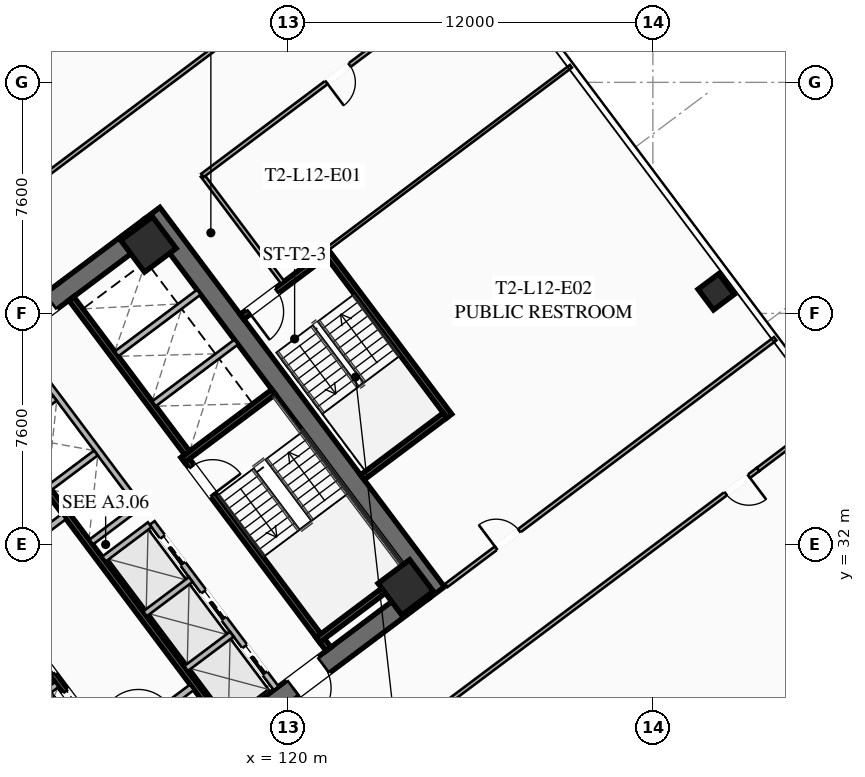
"""IFC4 building model, lengths in metres.
Left out: names, types, materials, properties, quantities, classifications, styles, units other than length and angle.
Written with IfcOpenShell. Run it as: python <this file> out.ifc"""

import sys

from ifc_helpers import new_model, si_unit, direction, frame, frame_2d, origin, origin_2d, place, context, subcontext, project, spatial, rectangle, hollow_rectangle, extrude, element, fill, save


model = new_model("IFC4")
c1 = context("Model", 3, precision=1e-05, world=origin(), true_north=direction((0.0, 1.0)))
c2 = subcontext(c1, "Body", "Model", "MODEL_VIEW")
j1 = project(units=[si_unit("LENGTHUNIT", "METRE"), si_unit("PLANEANGLEUNIT", "RADIAN")], contexts=[c1])
p1 = place(None, origin())
s1 = spatial("IfcSite", under=j1, at=p1, CompositionType="ELEMENT")
p2 = place(p1, origin())
s2 = spatial("IfcBuilding", under=s1, at=p2, CompositionType="ELEMENT")
p3 = place(p2, frame((0.0, 0.0, 49.45)))
s3 = spatial("IfcBuildingStorey", under=s2, at=p3, CompositionType="ELEMENT", Elevation=49.45)
for number, where, z_axis, x_axis in (
    (1, (112.476, 21.107, 0.0), (0.0, 0.0, 1.0), (-0.6, 0.8, 0.0)),
    (2, (115.524, 42.893, 0.0), (0.0, 0.0, 1.0), (0.6, -0.8, 0.0)),
):
    element("IfcWall", number, at=place(p3, frame(where, z_axis=z_axis, x_axis=x_axis)), inside=s3, PredefinedType="SHEAR", context=c2, shape_type="SweptSolid", body=[
        extrude(rectangle(XDim=15.6, YDim=0.65, at=frame_2d((7.8, 0.0))), origin(), (0.0, 0.0, 1.0), 3.55),
    ])
p4 = place(p3, frame((124.429, 30.478, 0.0), z_axis=(0.0, 0.0, 1.0), x_axis=(-0.799998028465, -0.600002628705, 0.0)))
e3 = element("IfcWall", 3, at=p4, inside=s3, PredefinedType="SHEAR", context=c2, shape_type="SweptSolid", body=[
    extrude(rectangle(XDim=14.86, YDim=0.65, at=frame_2d((7.43, 0.0))), origin(), (0.0, 0.0, 1.0), 3.55),
])
p5 = place(p4, frame((9.13, 0.0, 0.0)))
e4 = element("IfcOpeningElement", 4, at=p5, cuts=e3, PredefinedType="OPENING", context=c2, shape_type="SweptSolid", body=[
    extrude(rectangle(XDim=1.25, YDim=2.25, at=frame_2d((0.625, 1.125))), frame((0.0, 0.335, 0.0), z_axis=(0.0, -1.0, 0.0), x_axis=(1.0, 0.0, 0.0)), (0.0, 0.0, 1.0), 0.67),
])
p6 = place(p4, frame((4.08, 0.0, 0.0)))
e5 = element("IfcOpeningElement", 5, at=p6, cuts=e3, PredefinedType="OPENING", context=c2, shape_type="SweptSolid", body=[
    extrude(rectangle(XDim=1.25, YDim=2.25, at=frame_2d((0.625, 1.125))), frame((0.0, 0.335, 0.0), z_axis=(0.0, -1.0, 0.0), x_axis=(1.0, 0.0, 0.0)), (0.0, 0.0, 1.0), 0.67),
])
p7 = place(p3, frame((103.571, 33.522, 0.0), z_axis=(0.0, 0.0, 1.0), x_axis=(0.799998028465, 0.600002628705, 0.0)))
e6 = element("IfcWall", 6, at=p7, inside=s3, PredefinedType="SHEAR", context=c2, shape_type="SweptSolid", body=[
    extrude(rectangle(XDim=14.86, YDim=0.65, at=frame_2d((7.43, 0.0))), origin(), (0.0, 0.0, 1.0), 3.55),
])
p8 = place(p7, frame((4.48, 0.0, 0.0)))
e7 = element("IfcOpeningElement", 7, at=p8, cuts=e6, PredefinedType="OPENING", context=c2, shape_type="SweptSolid", body=[
    extrude(rectangle(XDim=1.25, YDim=2.25, at=frame_2d((0.625, 1.125))), frame((0.0, 0.335, 0.0), z_axis=(0.0, -1.0, 0.0), x_axis=(1.0, 0.0, 0.0)), (0.0, 0.0, 1.0), 0.67),
])
p9 = place(p7, frame((9.53, 0.0, 0.0)))
e8 = element("IfcOpeningElement", 8, at=p9, cuts=e6, PredefinedType="OPENING", context=c2, shape_type="SweptSolid", body=[
    extrude(rectangle(XDim=1.25, YDim=2.25, at=frame_2d((0.625, 1.125))), frame((0.0, 0.335, 0.0), z_axis=(0.0, -1.0, 0.0), x_axis=(1.0, 0.0, 0.0)), (0.0, 0.0, 1.0), 0.67),
])
for number, where, z_axis, x_axis in (
    (9, (123.87, 30.59, 0.0), (0.0, 0.0, 1.0), (0.8, 0.6, 0.0)),
    (10, (115.41, 41.87, 0.0), (0.0, 0.0, 1.0), (0.8, 0.6, 0.0)),
):
    element("IfcColumn", number, at=place(p3, frame(where, z_axis=z_axis, x_axis=x_axis)), inside=s3, PredefinedType="COLUMN", context=c2, shape_type="SweptSolid", body=[
        extrude(hollow_rectangle(XDim=1.3, YDim=1.3, WallThickness=0.05, at=origin_2d()), origin(), (0.0, 0.0, 1.0), 3.35),
    ])
p10 = place(p3, frame((134.08, 40.31, 0.0), z_axis=(0.0, 0.0, 1.0), x_axis=(0.799999996291, 0.600000004945, 0.0)))
e11 = element("IfcColumn", 11, at=p10, inside=s3, PredefinedType="COLUMN", context=c2, shape_type="SweptSolid", body=[
    extrude(hollow_rectangle(XDim=0.85, YDim=0.85, WallThickness=0.035, at=origin_2d()), origin(), (0.0, 0.0, 1.0), 3.35),
])
p11 = place(p3, frame((116.56, 34.92, 0.0), z_axis=(0.0, 0.0, 1.0), x_axis=(0.600009827119, -0.799992629566, 0.0)))
e12 = element("IfcWall", 12, at=p11, inside=s3, PredefinedType="SHEAR", context=c2, shape_type="SweptSolid", body=[
    extrude(rectangle(XDim=7.95, YDim=0.2, at=frame_2d((3.975, 0.0))), origin(), (0.0, 0.0, 1.0), 3.35),
])
p12 = place(p11, frame((0.45, 0.0, 0.0)))
e13 = element("IfcOpeningElement", 13, at=p12, cuts=e12, PredefinedType="OPENING", context=c2, shape_type="SweptSolid", body=[
    extrude(rectangle(XDim=1.15, YDim=2.2, at=frame_2d((0.575, 1.1))), frame((0.0, 0.11, 0.0), z_axis=(0.0, -1.0, 0.0), x_axis=(1.0, 0.0, 0.0)), (0.0, 0.0, 1.0), 0.22),
])
for number, where, z_axis, x_axis in (
    (14, (116.54, 34.78, 0.0), (0.0, 0.0, 1.0), (0.8, 0.6, 0.0)),
    (15, (120.98, 28.86, 0.0), (0.0, 0.0, 1.0), (0.8, 0.6, 0.0)),
):
    element("IfcWall", number, at=place(p3, frame(where, z_axis=z_axis, x_axis=x_axis)), inside=s3, PredefinedType="SHEAR", context=c2, shape_type="SweptSolid", body=[
        extrude(rectangle(XDim=3.73, YDim=0.2, at=frame_2d((1.865, 0.0))), origin(), (0.0, 0.0, 1.0), 3.35),
    ])
p13 = place(p3, frame((117.938, 26.016, 0.0), z_axis=(0.0, 0.0, 1.0), x_axis=(-0.600005463273, 0.799995902516, 0.0)))
e16 = element("IfcWall", 16, at=p13, inside=s3, PredefinedType="SHEAR", context=c2, shape_type="SweptSolid", body=[
    extrude(rectangle(XDim=14.3, YDim=0.2, at=frame_2d((7.15, 0.0))), origin(), (0.0, 0.0, 1.0), 3.35),
])
p14 = place(p3, frame((110.104, 31.028, 0.0), z_axis=(0.0, 0.0, 1.0), x_axis=(0.800018601094, 0.59997519774, 0.0)))
e17 = element("IfcWall", 17, at=p14, inside=s3, PredefinedType="SOLIDWALL", context=c2, shape_type="SweptSolid", body=[
    extrude(rectangle(XDim=3.15, YDim=0.22, at=frame_2d((1.575, 0.0))), origin(), (0.0, 0.0, 1.0), 2.703),
])
p15 = place(p3, frame((114.316, 25.412, 0.0), z_axis=(0.0, 0.0, 1.0), x_axis=(0.800018601094, 0.59997519774, 0.0)))
e18 = element("IfcWall", 18, at=p15, inside=s3, PredefinedType="SOLIDWALL", context=c2, shape_type="SweptSolid", body=[
    extrude(rectangle(XDim=3.15, YDim=0.22, at=frame_2d((1.575, 0.0))), origin(), (0.0, 0.0, 1.0), 2.703),
])
p16 = place(p15, frame((0.95, 0.0, 0.0)))
e19 = element("IfcOpeningElement", 19, at=p16, cuts=e18, PredefinedType="OPENING", context=c2, shape_type="SweptSolid", body=[
    extrude(rectangle(XDim=1.25, YDim=2.25, at=frame_2d((0.625, 1.125))), frame((0.0, 0.12, 0.0), z_axis=(0.0, -1.0, 0.0), x_axis=(1.0, 0.0, 0.0)), (0.0, 0.0, 1.0), 0.24),
])
p17 = place(p3, frame((115.13, 23.91, 0.0), z_axis=(0.0, 0.0, 1.0), x_axis=(-0.599975393228, 0.800018454488, 0.0)))
e20 = element("IfcWall", 20, at=p17, inside=s3, PredefinedType="SHEAR", context=c2, shape_type="SweptSolid", body=[
    extrude(rectangle(XDim=6.35, YDim=0.2, at=frame_2d((3.175, 0.0))), origin(), (0.0, 0.0, 1.0), 3.35),
])
p18 = place(p17, frame((4.775, 0.0, 0.0)))
e21 = element("IfcOpeningElement", 21, at=p18, cuts=e20, PredefinedType="OPENING", context=c2, shape_type="SweptSolid", body=[
    extrude(rectangle(XDim=1.3, YDim=2.25, at=frame_2d((0.65, 1.125))), frame((0.0, 0.11, 0.0), z_axis=(0.0, -1.0, 0.0), x_axis=(1.0, 0.0, 0.0)), (0.0, 0.0, 1.0), 0.22),
])
p19 = place(p17, frame((2.775, 0.0, 0.0)))
e22 = element("IfcOpeningElement", 22, at=p19, cuts=e20, PredefinedType="OPENING", context=c2, shape_type="SweptSolid", body=[
    extrude(rectangle(XDim=1.3, YDim=2.25, at=frame_2d((0.65, 1.125))), frame((0.0, 0.11, 0.0), z_axis=(0.0, -1.0, 0.0), x_axis=(1.0, 0.0, 0.0)), (0.0, 0.0, 1.0), 0.22),
])
p20 = place(p17, frame((0.575, 0.0, 0.0)))
e23 = element("IfcOpeningElement", 23, at=p20, cuts=e20, PredefinedType="OPENING", context=c2, shape_type="SweptSolid", body=[
    extrude(rectangle(XDim=1.3, YDim=2.25, at=frame_2d((0.65, 1.125))), frame((0.0, 0.11, 0.0), z_axis=(0.0, -1.0, 0.0), x_axis=(1.0, 0.0, 0.0)), (0.0, 0.0, 1.0), 0.22),
])
p21 = place(p3, frame((109.688, 25.366, 0.0), z_axis=(0.0, 0.0, 1.0), x_axis=(0.8, 0.6, 0.0)))
e24 = element("IfcWall", 24, at=p21, inside=s3, PredefinedType="SOLIDWALL", context=c2, shape_type="SweptSolid", body=[
    extrude(rectangle(XDim=3.38, YDim=0.2, at=frame_2d((1.69, 0.0))), origin(), (0.0, 0.0, 1.0), 3.35),
])
p22 = place(p3, frame((112.87, 40.09, 0.0), z_axis=(0.0, 0.0, 1.0), x_axis=(0.599975393228, -0.800018454488, 0.0)))
e25 = element("IfcWall", 25, at=p22, inside=s3, PredefinedType="SHEAR", context=c2, shape_type="SweptSolid", body=[
    extrude(rectangle(XDim=6.35, YDim=0.2, at=frame_2d((3.175, 0.0))), origin(), (0.0, 0.0, 1.0), 3.35),
])
for number, where, z_axis, x_axis in (
    (26, (115.59, 36.63, 0.0), (0.0, 0.0, 1.0), (0.8, 0.6, 0.0)),
    (27, (114.36, 38.27, 0.0), (0.0, 0.0, 1.0), (0.8, 0.6, 0.0)),
):
    element("IfcWall", number, at=place(p3, frame(where, z_axis=z_axis, x_axis=x_axis)), inside=s3, PredefinedType="SOLIDWALL", context=c2, shape_type="SweptSolid", body=[
        extrude(rectangle(XDim=3.38, YDim=0.2, at=frame_2d((1.69, 0.0))), origin(), (0.0, 0.0, 1.0), 3.35),
    ])
p23 = place(p3, frame((119.61, 27.27, 0.0), z_axis=(0.0, 0.0, 1.0), x_axis=(-0.600011488909, 0.79999138319, 0.0)))
e28 = element("IfcWall", 28, at=p23, inside=s3, PredefinedType="SOLIDWALL", context=c2, shape_type="SweptSolid", body=[
    extrude(rectangle(XDim=6.8, YDim=0.2, at=frame_2d((3.4, 0.0))), origin(), (0.0, 0.0, 1.0), 3.35),
])
p24 = place(p23, frame((0.625, 0.0, 0.0)))
e29 = element("IfcOpeningElement", 29, at=p24, cuts=e28, PredefinedType="OPENING", context=c2, shape_type="SweptSolid", body=[
    extrude(rectangle(XDim=1.1, YDim=2.2, at=frame_2d((0.55, 1.1))), frame((0.0, 0.11, 0.0), z_axis=(0.0, -1.0, 0.0), x_axis=(1.0, 0.0, 0.0)), (0.0, 0.0, 1.0), 0.22),
])
p25 = place(p23, frame((2.875, 0.0, 0.0)))
e30 = element("IfcOpeningElement", 30, at=p25, cuts=e28, PredefinedType="OPENING", context=c2, shape_type="SweptSolid", body=[
    extrude(rectangle(XDim=1.1, YDim=2.2, at=frame_2d((0.55, 1.1))), frame((0.0, 0.11, 0.0), z_axis=(0.0, -1.0, 0.0), x_axis=(1.0, 0.0, 0.0)), (0.0, 0.0, 1.0), 0.22),
])
p26 = place(p23, frame((5.125, 0.0, 0.0)))
e31 = element("IfcOpeningElement", 31, at=p26, cuts=e28, PredefinedType="OPENING", context=c2, shape_type="SweptSolid", body=[
    extrude(rectangle(XDim=1.1, YDim=2.2, at=frame_2d((0.55, 1.1))), frame((0.0, 0.11, 0.0), z_axis=(0.0, -1.0, 0.0), x_axis=(1.0, 0.0, 0.0)), (0.0, 0.0, 1.0), 0.22),
])
p27 = place(p3, frame((116.646, 27.922, 0.0), z_axis=(0.0, 0.0, 1.0), x_axis=(0.8, 0.6, 0.0)))
e32 = element("IfcWall", 32, at=p27, inside=s3, PredefinedType="SOLIDWALL", context=c2, shape_type="SweptSolid", body=[
    extrude(rectangle(XDim=1.88, YDim=0.2, at=frame_2d((0.94, 0.0))), origin(), (0.0, 0.0, 1.0), 3.35),
])
p28 = place(p3, frame((115.296, 29.722, 0.0), z_axis=(0.0, 0.0, 1.0), x_axis=(0.799984418148, 0.600020775241, 0.0)))
e33 = element("IfcWall", 33, at=p28, inside=s3, PredefinedType="SOLIDWALL", context=c2, shape_type="SweptSolid", body=[
    extrude(rectangle(XDim=1.88, YDim=0.2, at=frame_2d((0.94, 0.0))), origin(), (0.0, 0.0, 1.0), 3.35),
])
p29 = place(p3, frame((113.946, 31.522, 0.0), z_axis=(0.0, 0.0, 1.0), x_axis=(0.8, 0.6, 0.0)))
e34 = element("IfcWall", 34, at=p29, inside=s3, PredefinedType="SOLIDWALL", context=c2, shape_type="SweptSolid", body=[
    extrude(rectangle(XDim=1.88, YDim=0.2, at=frame_2d((0.94, 0.0))), origin(), (0.0, 0.0, 1.0), 3.35),
])
p30 = place(p3, frame((115.11, 33.27, 0.0), z_axis=(0.0, 0.0, 1.0), x_axis=(-0.600011488909, 0.79999138319, 0.0)))
e35 = element("IfcWall", 35, at=p30, inside=s3, PredefinedType="SOLIDWALL", context=c2, shape_type="SweptSolid", body=[
    extrude(rectangle(XDim=6.8, YDim=0.2, at=frame_2d((3.4, 0.0))), origin(), (0.0, 0.0, 1.0), 3.35),
])
p31 = place(p3, frame((113.526, 32.082, 0.0), z_axis=(0.0, 0.0, 1.0), x_axis=(0.800046745961, 0.599937666993, 0.0)))
e36 = element("IfcWall", 36, at=p31, inside=s3, PredefinedType="SOLIDWALL", context=c2, shape_type="SweptSolid", body=[
    extrude(rectangle(XDim=1.88, YDim=0.2, at=frame_2d((0.94, 0.0))), origin(), (0.0, 0.0, 1.0), 3.35),
])
p32 = place(p3, frame((112.176, 33.882, 0.0), z_axis=(0.0, 0.0, 1.0), x_axis=(0.8, 0.6, 0.0)))
e37 = element("IfcWall", 37, at=p32, inside=s3, PredefinedType="SOLIDWALL", context=c2, shape_type="SweptSolid", body=[
    extrude(rectangle(XDim=1.88, YDim=0.2, at=frame_2d((0.94, 0.0))), origin(), (0.0, 0.0, 1.0), 3.35),
])
p33 = place(p3, frame((110.826, 35.682, 0.0), z_axis=(0.0, 0.0, 1.0), x_axis=(0.799984418148, 0.600020775241, 0.0)))
e38 = element("IfcWall", 38, at=p33, inside=s3, PredefinedType="SOLIDWALL", context=c2, shape_type="SweptSolid", body=[
    extrude(rectangle(XDim=1.88, YDim=0.2, at=frame_2d((0.94, 0.0))), origin(), (0.0, 0.0, 1.0), 3.35),
])
p34 = place(p3, frame((125.304, 36.228, 0.0), z_axis=(0.0, 0.0, 1.0), x_axis=(-0.59998851072, 0.800008616831, 0.0)))
e39 = element("IfcWall", 39, at=p34, inside=s3, PredefinedType="SHEAR", context=c2, shape_type="SweptSolid", body=[
    extrude(rectangle(XDim=6.8, YDim=0.2, at=frame_2d((3.4, 0.0))), origin(), (0.0, 0.0, 1.0), 3.35),
])
p35 = place(p3, frame((121.204, 41.528, 0.0), z_axis=(0.0, 0.0, 1.0), x_axis=(-0.800017232136, -0.599977023131, 0.0)))
e40 = element("IfcWall", 40, at=p35, inside=s3, PredefinedType="SHEAR", context=c2, shape_type="SweptSolid", body=[
    extrude(rectangle(XDim=3.4, YDim=0.2, at=frame_2d((1.7, 0.0))), origin(), (0.0, 0.0, 1.0), 3.35),
])
p36 = place(p35, frame((1.975, 0.0, 0.0)))
e41 = element("IfcOpeningElement", 41, at=p36, cuts=e40, PredefinedType="OPENING", context=c2, shape_type="SweptSolid", body=[
    extrude(rectangle(XDim=1.15, YDim=2.2, at=frame_2d((0.575, 1.1))), frame((0.0, 0.11, 0.0), z_axis=(0.0, -1.0, 0.0), x_axis=(1.0, 0.0, 0.0)), (0.0, 0.0, 1.0), 0.22),
])
p37 = place(p3, frame((122.444, 34.208, 0.0), z_axis=(0.0, 0.0, 1.0), x_axis=(0.79999138319, 0.600011488909, 0.0)))
e42 = element("IfcWall", 42, at=p37, inside=s3, PredefinedType="SHEAR", context=c2, shape_type="SweptSolid", body=[
    extrude(rectangle(XDim=3.4, YDim=0.2, at=frame_2d((1.7, 0.0))), origin(), (0.0, 0.0, 1.0), 3.35),
])
p38 = place(p3, frame((119.824, 40.618, 0.0), z_axis=(0.0, 0.0, 1.0), x_axis=(-0.599982243973, 0.800013316712, 0.0)))
e43 = element("IfcWall", 43, at=p38, inside=s3, PredefinedType="PARTITIONING", context=c2, shape_type="SweptSolid", body=[
    extrude(rectangle(XDim=4.4, YDim=0.135, at=frame_2d((2.2, 0.0))), origin(), (0.0, 0.0, 1.0), 2.703),
])
p39 = place(p3, frame((98.516, 34.012, 0.0), z_axis=(0.0, 0.0, 1.0), x_axis=(0.799998035726, 0.600002619023, 0.0)))
e44 = element("IfcWall", 44, at=p39, inside=s3, PredefinedType="PARTITIONING", context=c2, shape_type="SweptSolid", body=[
    extrude(rectangle(XDim=29.83, YDim=0.135, at=frame_2d((14.915, 0.0))), origin(), (0.0, 0.0, 1.0), 2.703),
])
p40 = place(p39, frame((0.3, 0.0, 0.0)))
e45 = element("IfcOpeningElement", 45, at=p40, cuts=e44, PredefinedType="OPENING", context=c2, shape_type="SweptSolid", body=[
    extrude(rectangle(XDim=0.95, YDim=2.05, at=frame_2d((0.475, 1.025))), frame((0.0, 0.077, 0.0), z_axis=(0.0, -1.0, 0.0), x_axis=(1.0, 0.0, 0.0)), (0.0, 0.0, 1.0), 0.155),
])
p41 = place(p39, frame((28.58, 0.0, 0.0)))
e46 = element("IfcOpeningElement", 46, at=p41, cuts=e44, PredefinedType="OPENING", context=c2, shape_type="SweptSolid", body=[
    extrude(rectangle(XDim=0.95, YDim=2.05, at=frame_2d((0.475, 1.025))), frame((0.0, 0.077, 0.0), z_axis=(0.0, -1.0, 0.0), x_axis=(1.0, 0.0, 0.0)), (0.0, 0.0, 1.0), 0.155),
])
p42 = place(p3, frame((135.46, 34.47, 0.0), z_axis=(0.0, 0.0, 1.0), x_axis=(-0.800000982127, -0.599998690494, 0.0)))
e47 = element("IfcWall", 47, at=p42, inside=s3, PredefinedType="PARTITIONING", context=c2, shape_type="SweptSolid", body=[
    extrude(rectangle(XDim=29.83, YDim=0.135, at=frame_2d((14.915, 0.0))), origin(), (0.0, 0.0, 1.0), 2.703),
])
p43 = place(p42, frame((28.5, 0.0, 0.0)))
e48 = element("IfcOpeningElement", 48, at=p43, cuts=e47, PredefinedType="OPENING", context=c2, shape_type="SweptSolid", body=[
    extrude(rectangle(XDim=0.95, YDim=2.05, at=frame_2d((0.475, 1.025))), frame((0.0, 0.077, 0.0), z_axis=(0.0, -1.0, 0.0), x_axis=(1.0, 0.0, 0.0)), (0.0, 0.0, 1.0), 0.155),
])
p44 = place(p42, frame((0.38, 0.0, 0.0)))
e49 = element("IfcOpeningElement", 49, at=p44, cuts=e47, PredefinedType="OPENING", context=c2, shape_type="SweptSolid", body=[
    extrude(rectangle(XDim=0.95, YDim=2.05, at=frame_2d((0.475, 1.025))), frame((0.0, 0.077, 0.0), z_axis=(0.0, -1.0, 0.0), x_axis=(1.0, 0.0, 0.0)), (0.0, 0.0, 1.0), 0.155),
])
p45 = place(p3, frame((135.46, 34.47, 0.0), z_axis=(0.0, 0.0, 1.0), x_axis=(0.799990331366, 0.600012891296, 0.0)))
e50 = element("IfcWall", 50, at=p45, inside=s3, PredefinedType="PARTITIONING", context=c2, shape_type="SweptSolid", body=[
    extrude(rectangle(XDim=3.03, YDim=0.135, at=frame_2d((1.515, 0.0))), origin(), (0.0, 0.0, 1.0), 2.703),
])
p46 = place(p3, frame((126.664, 51.248, 0.0), z_axis=(0.0, 0.0, 1.0), x_axis=(-0.799995055373, -0.600006592779, 0.0)))
e51 = element("IfcWall", 51, at=p46, inside=s3, PredefinedType="PARTITIONING", context=c2, shape_type="SweptSolid", body=[
    extrude(rectangle(XDim=11.85, YDim=0.135, at=frame_2d((5.925, 0.0))), origin(), (0.0, 0.0, 1.0), 2.703),
])
p47 = place(p46, frame((5.8, 0.0, 0.0)))
e52 = element("IfcOpeningElement", 52, at=p47, cuts=e51, PredefinedType="OPENING", context=c2, shape_type="SweptSolid", body=[
    extrude(rectangle(XDim=0.95, YDim=2.05, at=frame_2d((0.475, 1.025))), frame((0.0, 0.077, 0.0), z_axis=(0.0, -1.0, 0.0), x_axis=(1.0, 0.0, 0.0)), (0.0, 0.0, 1.0), 0.155),
])
p48 = place(p3, frame((125.208, 30.656, 0.0), z_axis=(0.0, 0.0, 1.0), x_axis=(0.799995666112, 0.600005778473, 0.0)))
e53 = element("IfcWall", 53, at=p48, inside=s3, PredefinedType="PARTITIONING", context=c2, shape_type="SweptSolid", body=[
    extrude(rectangle(XDim=13.52, YDim=0.135, at=frame_2d((6.76, 0.0))), origin(), (0.0, 0.0, 1.0), 2.703),
])
p49 = place(p48, frame((2.045, 0.0, 0.0)))
e54 = element("IfcOpeningElement", 54, at=p49, cuts=e53, PredefinedType="OPENING", context=c2, shape_type="SweptSolid", body=[
    extrude(rectangle(XDim=0.95, YDim=2.05, at=frame_2d((0.475, 1.025))), frame((0.0, 0.077, 0.0), z_axis=(0.0, -1.0, 0.0), x_axis=(1.0, 0.0, 0.0)), (0.0, 0.0, 1.0), 0.155),
])
p50 = place(p3, frame((129.304, 47.728, 0.0), z_axis=(0.0, 0.0, 1.0), x_axis=(-0.8, -0.6, 0.0)))
e55 = element("IfcWall", 55, at=p50, inside=s3, PredefinedType="PARTITIONING", context=c2, shape_type="SweptSolid", body=[
    extrude(rectangle(XDim=10.0, YDim=0.11, at=frame_2d((5.0, 0.0))), origin(), (0.0, 0.0, 1.0), 2.703),
])
p51 = place(p6, origin())
e56 = element("IfcDoor", 56, at=p51, inside=s3, OperationType="SINGLE_SWING_RIGHT", PredefinedType="DOOR", context=c2, shape_type="SweptSolid", body=[
    extrude(rectangle(XDim=1.25, YDim=2.25, at=frame_2d((0.625, 1.125))), frame((0.0, 0.025, 0.0), z_axis=(0.0, -1.0, 0.0), x_axis=(1.0, 0.0, 0.0)), (0.0, 0.0, 1.0), 0.05),
])
fill(e5, e56)
p52 = place(p12, origin())
e57 = element("IfcDoor", 57, at=p52, inside=s3, OperationType="SINGLE_SWING_RIGHT", PredefinedType="DOOR", context=c2, shape_type="SweptSolid", body=[
    extrude(rectangle(XDim=1.15, YDim=2.2, at=frame_2d((0.575, 1.1))), frame((0.0, 0.025, 0.0), z_axis=(0.0, -1.0, 0.0), x_axis=(1.0, 0.0, 0.0)), (0.0, 0.0, 1.0), 0.05),
])
fill(e13, e57)
p53 = place(p36, origin())
e58 = element("IfcDoor", 58, at=p53, inside=s3, OperationType="SINGLE_SWING_RIGHT", PredefinedType="DOOR", context=c2, shape_type="SweptSolid", body=[
    extrude(rectangle(XDim=1.15, YDim=2.2, at=frame_2d((0.575, 1.1))), frame((0.0, 0.025, 0.0), z_axis=(0.0, -1.0, 0.0), x_axis=(1.0, 0.0, 0.0)), (0.0, 0.0, 1.0), 0.05),
])
fill(e41, e58)
p54 = place(p44, origin())
e59 = element("IfcDoor", 59, at=p54, inside=s3, OperationType="SINGLE_SWING_LEFT", PredefinedType="DOOR", context=c2, shape_type="SweptSolid", body=[
    extrude(rectangle(XDim=0.95, YDim=2.05, at=frame_2d((0.475, 1.025))), frame((0.0, 0.025, 0.0), z_axis=(0.0, -1.0, 0.0), x_axis=(1.0, 0.0, 0.0)), (0.0, 0.0, 1.0), 0.05),
])
fill(e49, e59)
p55 = place(p47, origin())
e60 = element("IfcDoor", 60, at=p55, inside=s3, OperationType="SINGLE_SWING_RIGHT", PredefinedType="DOOR", context=c2, shape_type="SweptSolid", body=[
    extrude(rectangle(XDim=0.95, YDim=2.05, at=frame_2d((0.475, 1.025))), frame((0.0, 0.025, 0.0), z_axis=(0.0, -1.0, 0.0), x_axis=(1.0, 0.0, 0.0)), (0.0, 0.0, 1.0), 0.05),
])
fill(e52, e60)
p56 = place(p49, origin())
e61 = element("IfcDoor", 61, at=p56, inside=s3, OperationType="SINGLE_SWING_LEFT", PredefinedType="DOOR", context=c2, shape_type="SweptSolid", body=[
    extrude(rectangle(XDim=0.95, YDim=2.05, at=frame_2d((0.475, 1.025))), frame((0.0, 0.025, 0.0), z_axis=(0.0, -1.0, 0.0), x_axis=(1.0, 0.0, 0.0)), (0.0, 0.0, 1.0), 0.05),
])
fill(e54, e61)
p57 = place(p18, origin())
e62 = element("IfcDoor", 62, at=p57, inside=s3, OperationType="SLIDING_TO_LEFT", PredefinedType="DOOR", context=c2, shape_type="SweptSolid", body=[
    extrude(rectangle(XDim=1.3, YDim=2.25, at=frame_2d((0.65, 1.125))), frame((0.0, 0.025, 0.0), z_axis=(0.0, -1.0, 0.0), x_axis=(1.0, 0.0, 0.0)), (0.0, 0.0, 1.0), 0.05),
])
fill(e21, e62)
p58 = place(p19, origin())
e63 = element("IfcDoor", 63, at=p58, inside=s3, OperationType="SLIDING_TO_LEFT", PredefinedType="DOOR", context=c2, shape_type="SweptSolid", body=[
    extrude(rectangle(XDim=1.3, YDim=2.25, at=frame_2d((0.65, 1.125))), frame((0.0, 0.025, 0.0), z_axis=(0.0, -1.0, 0.0), x_axis=(1.0, 0.0, 0.0)), (0.0, 0.0, 1.0), 0.05),
])
fill(e22, e63)
p59 = place(p24, origin())
e64 = element("IfcDoor", 64, at=p59, inside=s3, OperationType="SLIDING_TO_LEFT", PredefinedType="DOOR", context=c2, shape_type="SweptSolid", body=[
    extrude(rectangle(XDim=1.1, YDim=2.2, at=frame_2d((0.55, 1.1))), frame((0.0, 0.025, 0.0), z_axis=(0.0, -1.0, 0.0), x_axis=(1.0, 0.0, 0.0)), (0.0, 0.0, 1.0), 0.05),
])
fill(e29, e64)
p60 = place(p25, origin())
e65 = element("IfcDoor", 65, at=p60, inside=s3, OperationType="SLIDING_TO_LEFT", PredefinedType="DOOR", context=c2, shape_type="SweptSolid", body=[
    extrude(rectangle(XDim=1.1, YDim=2.2, at=frame_2d((0.55, 1.1))), frame((0.0, 0.025, 0.0), z_axis=(0.0, -1.0, 0.0), x_axis=(1.0, 0.0, 0.0)), (0.0, 0.0, 1.0), 0.05),
])
fill(e30, e65)
p61 = place(p26, origin())
e66 = element("IfcDoor", 66, at=p61, inside=s3, OperationType="SLIDING_TO_LEFT", PredefinedType="DOOR", context=c2, shape_type="SweptSolid", body=[
    extrude(rectangle(XDim=1.1, YDim=2.2, at=frame_2d((0.55, 1.1))), frame((0.0, 0.025, 0.0), z_axis=(0.0, -1.0, 0.0), x_axis=(1.0, 0.0, 0.0)), (0.0, 0.0, 1.0), 0.05),
])
fill(e31, e66)
save(model, sys.argv[1])
